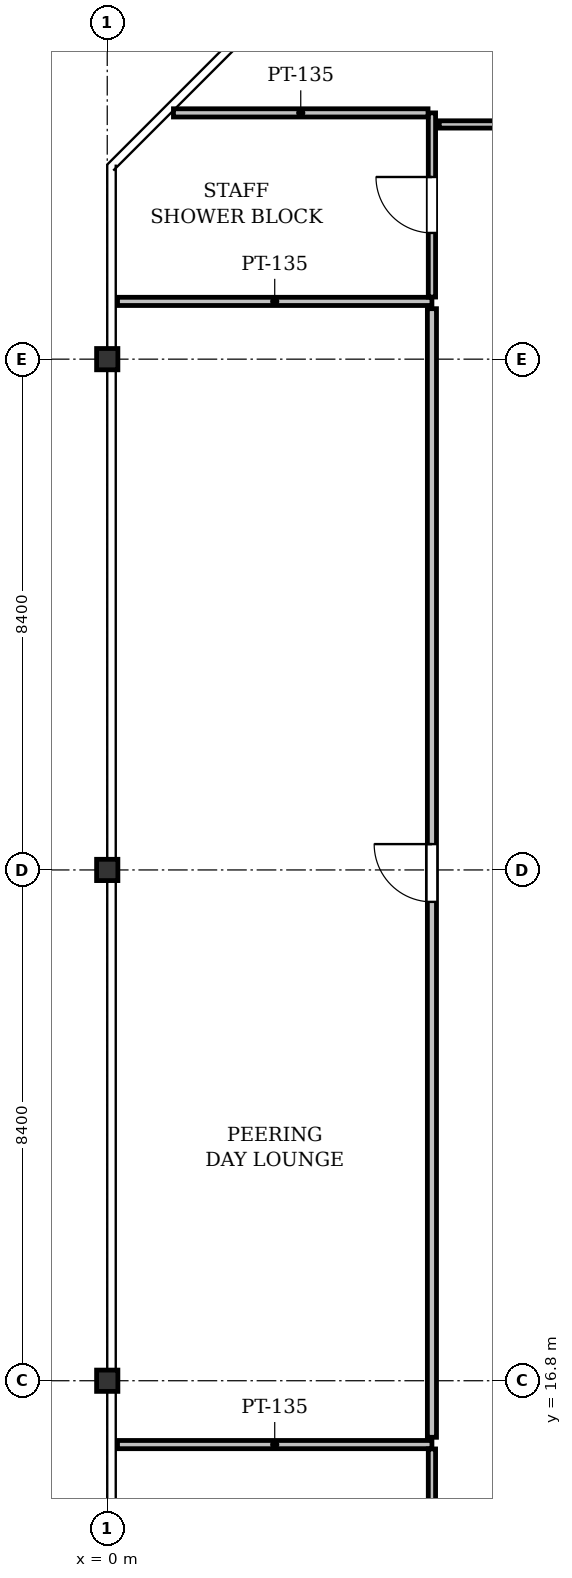
"""IFC4 building model, lengths in metres.
Left out: names, types, materials, properties, quantities, classifications, styles, units other than length and angle.
Written with IfcOpenShell. Run it as: python <this file> out.ifc"""

import sys

from ifc_helpers import new_model, si_unit, direction, frame, frame_2d, origin, origin_2d, place, context, subcontext, project, spatial, rectangle, i_section, extrude, element, fill, save


model = new_model("IFC4")
c1 = context("Model", 3, precision=1e-05, world=origin(), true_north=direction((0.0, 1.0)))
c2 = subcontext(c1, "Body", "Model", "MODEL_VIEW")
j1 = project(units=[si_unit("LENGTHUNIT", "METRE"), si_unit("PLANEANGLEUNIT", "RADIAN")], contexts=[c1])
p1 = place(None, origin())
s1 = spatial("IfcSite", under=j1, at=p1, CompositionType="ELEMENT")
p2 = place(p1, origin())
s2 = spatial("IfcBuilding", under=s1, at=p2, CompositionType="ELEMENT")
p3 = place(p2, frame((0.0, 0.0, 237.0)))
s3 = spatial("IfcBuildingStorey", under=s2, at=p3, CompositionType="ELEMENT", Elevation=237.0)
for number, where, z_axis, x_axis in (
    (1, (0.0, 16.8, 0.0), (0.0, 0.0, 1.0), (1.0, 0.0, 0.0)),
    (2, (0.0, 25.2, 0.0), (0.0, 0.0, 1.0), (1.0, 0.0, 0.0)),
    (3, (0.0, 33.6, 0.0), (0.0, 0.0, 1.0), (1.0, 0.0, 0.0)),
):
    element("IfcColumn", number, at=place(p3, frame(where, z_axis=z_axis, x_axis=x_axis)), inside=s3, PredefinedType="COLUMN", context=c2, shape_type="SweptSolid", body=[
        extrude(i_section(OverallWidth=0.35, OverallDepth=0.35, WebThickness=0.02, FlangeThickness=0.032, at=origin_2d()), origin(), (0.0, 0.0, 1.0), 4.1),
    ])
p4 = place(p3, frame((5.34, 15.75, 0.0), z_axis=(0.0, 0.0, 1.0), x_axis=(-1.0, 0.0, 0.0)))
e4 = element("IfcWall", 4, at=p4, inside=s3, PredefinedType="PARTITIONING", context=c2, shape_type="SweptSolid", body=[
    extrude(rectangle(XDim=5.171, YDim=0.135, at=frame_2d((2.585, 0.0))), origin(), (0.0, 0.0, 1.0), 3.518),
])
p5 = place(p3, frame((5.34, 12.6, 0.0), z_axis=(0.0, 0.0, 1.0), x_axis=(0.0, 1.0, 0.0)))
e5 = element("IfcWall", 5, at=p5, inside=s3, PredefinedType="PARTITIONING", context=c2, shape_type="SweptSolid", body=[
    extrude(rectangle(XDim=3.078, YDim=0.12, at=frame_2d((1.539, 0.0))), origin(), (0.0, 0.0, 1.0), 3.825),
])
p6 = place(p5, frame((1.079, 0.0, 0.0)))
e6 = element("IfcOpeningElement", 6, at=p6, cuts=e5, PredefinedType="OPENING", context=c2, shape_type="SweptSolid", body=[
    extrude(rectangle(XDim=0.92, YDim=2.1, at=frame_2d((0.46, 1.05))), frame((0.0, 0.07, 0.0), z_axis=(0.0, -1.0, 0.0), x_axis=(1.0, 0.0, 0.0)), (0.0, 0.0, 1.0), 0.14),
])
p7 = place(p3, frame((0.169, 34.55, 0.0), z_axis=(0.0, 0.0, 1.0), x_axis=(1.0, 0.0, 0.0)))
e7 = element("IfcWall", 7, at=p7, inside=s3, PredefinedType="PARTITIONING", context=c2, shape_type="SweptSolid", body=[
    extrude(rectangle(XDim=5.171, YDim=0.135, at=frame_2d((2.585, 0.0))), origin(), (0.0, 0.0, 1.0), 3.825),
])
p8 = place(p3, frame((5.34, 34.622, 0.0), z_axis=(0.0, 0.0, 1.0), x_axis=(0.0, 1.0, 0.0)))
e8 = element("IfcWall", 8, at=p8, inside=s3, PredefinedType="PARTITIONING", context=c2, shape_type="SweptSolid", body=[
    extrude(rectangle(XDim=3.028, YDim=0.12, at=frame_2d((1.514, 0.0))), origin(), (0.0, 0.0, 1.0), 3.825),
])
p9 = place(p8, frame((1.054, 0.0, 0.0)))
e9 = element("IfcOpeningElement", 9, at=p9, cuts=e8, PredefinedType="OPENING", context=c2, shape_type="SweptSolid", body=[
    extrude(rectangle(XDim=0.92, YDim=2.1, at=frame_2d((0.46, 1.05))), frame((0.0, 0.07, 0.0), z_axis=(0.0, -1.0, 0.0), x_axis=(1.0, 0.0, 0.0)), (0.0, 0.0, 1.0), 0.14),
])
p10 = place(p3, frame((5.276, 37.65, 0.0), z_axis=(0.0, 0.0, 1.0), x_axis=(-1.0, 0.0, 0.0)))
e10 = element("IfcWall", 10, at=p10, inside=s3, PredefinedType="PARTITIONING", context=c2, shape_type="SweptSolid", body=[
    extrude(rectangle(XDim=4.187, YDim=0.135, at=frame_2d((2.093, 0.0))), origin(), (0.0, 0.0, 1.0), 3.825),
])
p11 = place(p3, frame((5.46, 37.46, 0.0), z_axis=(0.0, 0.0, 1.0), x_axis=(1.0, 0.0, 0.0)))
e11 = element("IfcWall", 11, at=p11, inside=s3, PredefinedType="PARTITIONING", context=c2, shape_type="SweptSolid", body=[
    extrude(rectangle(XDim=2.19, YDim=0.12, at=frame_2d((1.095, 0.0))), origin(), (0.0, 0.0, 1.0), 3.825),
])
p12 = place(p3, frame((5.34, 15.87, 0.0), z_axis=(0.0, 0.0, 1.0), x_axis=(0.0, 1.0, 0.0)))
e12 = element("IfcWall", 12, at=p12, inside=s3, PredefinedType="PARTITIONING", context=c2, shape_type="SweptSolid", body=[
    extrude(rectangle(XDim=18.56, YDim=0.15, at=frame_2d((9.28, 0.0))), origin(), (0.0, 0.0, 1.0), 3.365),
])
p13 = place(p12, frame((8.805, 0.0, 0.0)))
e13 = element("IfcOpeningElement", 13, at=p13, cuts=e12, PredefinedType="OPENING", context=c2, shape_type="SweptSolid", body=[
    extrude(rectangle(XDim=0.95, YDim=2.15, at=frame_2d((0.475, 1.075))), frame((0.0, 0.085, 0.0), z_axis=(0.0, -1.0, 0.0), x_axis=(1.0, 0.0, 0.0)), (0.0, 0.0, 1.0), 0.17),
])
p14 = place(p9, origin())
e14 = element("IfcDoor", 14, at=p14, inside=s3, OperationType="SINGLE_SWING_RIGHT", PredefinedType="DOOR", context=c2, shape_type="SweptSolid", body=[
    extrude(rectangle(XDim=0.92, YDim=2.1, at=frame_2d((0.46, 1.05))), frame((0.0, 0.025, 0.0), z_axis=(0.0, -1.0, 0.0), x_axis=(1.0, 0.0, 0.0)), (0.0, 0.0, 1.0), 0.05),
])
fill(e9, e14)
p15 = place(p13, origin())
e15 = element("IfcDoor", 15, at=p15, inside=s3, OperationType="SINGLE_SWING_RIGHT", PredefinedType="DOOR", context=c2, shape_type="SweptSolid", body=[
    extrude(rectangle(XDim=0.95, YDim=2.15, at=frame_2d((0.475, 1.075))), frame((0.0, 0.025, 0.0), z_axis=(0.0, -1.0, 0.0), x_axis=(1.0, 0.0, 0.0)), (0.0, 0.0, 1.0), 0.05),
])
fill(e13, e15)
save(model, sys.argv[1])
